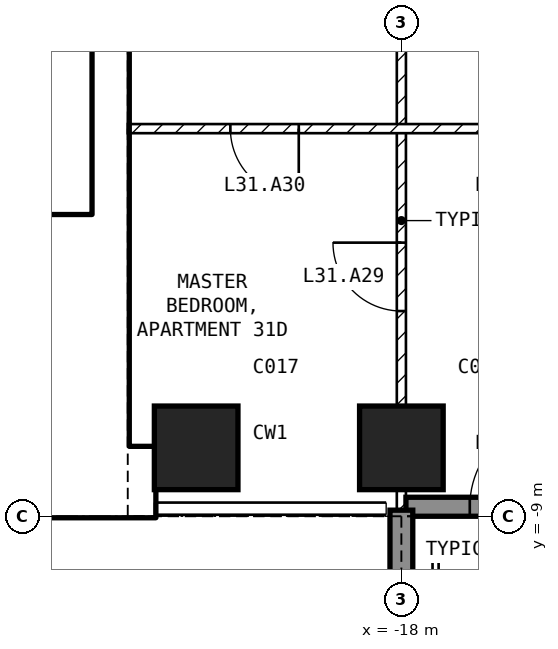
"""IFC4 building model, lengths in metres.
Left out: names, types, materials, properties, quantities, classifications, styles, units other than length and angle.
Written with IfcOpenShell. Run it as: python <this file> out.ifc"""

import sys

from ifc_helpers import new_model, si_unit, direction, frame, frame_2d, origin, origin_2d, place, context, subcontext, project, spatial, rectangle, extrude, element, fill, save


model = new_model("IFC4")
c1 = context("Model", 3, precision=1e-05, world=origin(), true_north=direction((0.0, 1.0)))
c2 = subcontext(c1, "Body", "Model", "MODEL_VIEW")
j1 = project(units=[si_unit("LENGTHUNIT", "METRE"), si_unit("PLANEANGLEUNIT", "RADIAN")], contexts=[c1])
p1 = place(None, origin())
s1 = spatial("IfcSite", under=j1, at=p1, CompositionType="ELEMENT")
p2 = place(p1, origin())
s2 = spatial("IfcBuilding", under=s1, at=p2, CompositionType="ELEMENT")
p3 = place(p2, frame((0.0, 0.0, 130.4)))
s3 = spatial("IfcBuildingStorey", under=s2, at=p3, CompositionType="ELEMENT", Elevation=130.4)
for number, where, z_axis, x_axis in (
    (1, (-20.7, -8.1, -0.25), (0.0, 0.0, 1.0), (1.0, 0.0, 0.0)),
    (2, (-18.0, -8.1, -0.25), (0.0, 0.0, 1.0), (1.0, 0.0, 0.0)),
):
    element("IfcColumn", number, at=place(p3, frame(where, z_axis=z_axis, x_axis=x_axis)), inside=s3, PredefinedType="COLUMN", context=c2, shape_type="SweptSolid", body=[
        extrude(rectangle(XDim=1.1, YDim=1.1, at=origin_2d()), origin(), (0.0, 0.0, 1.0), 3.5),
    ])
p4 = place(p3, frame((-17.94, -8.875, 0.0), z_axis=(0.0, 0.0, 1.0), x_axis=(1.0, 0.0, 0.0)))
e3 = element("IfcWall", 3, at=p4, inside=s3, PredefinedType="SOLIDWALL", context=c2, shape_type="SweptSolid", body=[
    extrude(rectangle(XDim=2.29, YDim=0.25, at=frame_2d((1.145, 0.0))), origin(), (0.0, 0.0, 1.0), 3.25),
])
p5 = place(p4, frame((0.84, 0.0, 0.0)))
e4 = element("IfcOpeningElement", 4, at=p5, cuts=e3, PredefinedType="OPENING", context=c2, shape_type="SweptSolid", body=[
    extrude(rectangle(XDim=1.2, YDim=2.4, at=frame_2d((0.6, 1.2))), frame((0.0, 0.135, 0.0), z_axis=(0.0, -1.0, 0.0), x_axis=(1.0, 0.0, 0.0)), (0.0, 0.0, 1.0), 0.27),
])
p6 = place(p3, frame((-18.0, -8.92, 0.0), z_axis=(0.0, 0.0, 1.0), x_axis=(0.0, -1.0, 0.0)))
e5 = element("IfcWall", 5, at=p6, inside=s3, PredefinedType="SOLIDWALL", context=c2, shape_type="SweptSolid", body=[
    extrude(rectangle(XDim=2.82, YDim=0.3, at=frame_2d((1.41, 0.0))), origin(), (0.0, 0.0, 1.0), 3.25),
])
p7 = place(p3, frame((-30.2, -8.55, 0.0), z_axis=(0.0, 0.0, 1.0), x_axis=(1.0, 0.0, 0.0)))
e6 = element("IfcWall", 6, at=p7, inside=s3, PredefinedType="SHEAR", context=c2, shape_type="SweptSolid", body=[
    extrude(rectangle(XDim=8.95, YDim=0.9, at=frame_2d((4.475, 0.0))), origin(), (0.0, 0.0, 1.0), 3.25),
])
p8 = place(p3, frame((-21.825, -8.1, 0.0), z_axis=(0.0, 0.0, 1.0), x_axis=(0.0, 1.0, 0.0)))
e7 = element("IfcWall", 7, at=p8, inside=s3, PredefinedType="SHEAR", context=c2, shape_type="SweptSolid", body=[
    extrude(rectangle(XDim=6.9, YDim=0.45, at=frame_2d((3.45, 0.0))), origin(), (0.0, 0.0, 1.0), 3.25),
])
p9 = place(p3, frame((-28.35, -5.15, 0.0), z_axis=(0.0, 0.0, 1.0), x_axis=(1.0, 0.0, 0.0)))
e8 = element("IfcWall", 8, at=p9, inside=s3, PredefinedType="SOLIDWALL", context=c2, shape_type="SweptSolid", body=[
    extrude(rectangle(XDim=6.3, YDim=0.2, at=frame_2d((3.15, 0.0))), origin(), (0.0, 0.0, 1.0), 3.25),
])
p10 = place(p9, frame((5.1, 0.0, 0.0)))
e9 = element("IfcOpeningElement", 9, at=p10, cuts=e8, PredefinedType="OPENING", context=c2, shape_type="SweptSolid", body=[
    extrude(rectangle(XDim=1.0, YDim=2.1, at=frame_2d((0.5, 1.05))), frame((0.0, 0.11, 0.0), z_axis=(0.0, -1.0, 0.0), x_axis=(1.0, 0.0, 0.0)), (0.0, 0.0, 1.0), 0.22),
])
p11 = place(p3, frame((-18.0, -8.92, 0.0), z_axis=(0.0, 0.0, 1.0), x_axis=(0.0, 1.0, 0.0)))
e10 = element("IfcWall", 10, at=p11, inside=s3, PredefinedType="PARTITIONING", context=c2, shape_type="SweptSolid", body=[
    extrude(rectangle(XDim=7.62, YDim=0.12, at=frame_2d((3.81, 0.0))), origin(), (0.0, 0.0, 1.0), 2.414),
])
p12 = place(p11, frame((2.62, 0.0, 0.0)))
e11 = element("IfcOpeningElement", 11, at=p12, cuts=e10, PredefinedType="OPENING", context=c2, shape_type="SweptSolid", body=[
    extrude(rectangle(XDim=0.9, YDim=2.1, at=frame_2d((0.45, 1.05))), frame((0.0, 0.07, 0.0), z_axis=(0.0, -1.0, 0.0), x_axis=(1.0, 0.0, 0.0)), (0.0, 0.0, 1.0), 0.14),
])
p13 = place(p3, frame((-15.0, -3.9, 0.0), z_axis=(0.0, 0.0, 1.0), x_axis=(-1.0, 0.0, 0.0)))
e12 = element("IfcWall", 12, at=p13, inside=s3, PredefinedType="PARTITIONING", context=c2, shape_type="SweptSolid", body=[
    extrude(rectangle(XDim=6.6, YDim=0.12, at=frame_2d((3.3, 0.0))), origin(), (0.0, 0.0, 1.0), 3.25),
])
p14 = place(p13, frame((1.05, 0.0, 0.0)))
e13 = element("IfcOpeningElement", 13, at=p14, cuts=e12, PredefinedType="OPENING", context=c2, shape_type="SweptSolid", body=[
    extrude(rectangle(XDim=0.9, YDim=2.1, at=frame_2d((0.45, 1.05))), frame((0.0, 0.07, 0.0), z_axis=(0.0, -1.0, 0.0), x_axis=(1.0, 0.0, 0.0)), (0.0, 0.0, 1.0), 0.14),
])
p15 = place(p13, frame((4.35, 0.0, 0.0)))
e14 = element("IfcOpeningElement", 14, at=p15, cuts=e12, PredefinedType="OPENING", context=c2, shape_type="SweptSolid", body=[
    extrude(rectangle(XDim=0.9, YDim=2.1, at=frame_2d((0.45, 1.05))), frame((0.0, 0.07, 0.0), z_axis=(0.0, -1.0, 0.0), x_axis=(1.0, 0.0, 0.0)), (0.0, 0.0, 1.0), 0.14),
])
p16 = place(p5, origin())
e15 = element("IfcDoor", 15, at=p16, inside=s3, OperationType="SINGLE_SWING_RIGHT", PredefinedType="DOOR", context=c2, shape_type="SweptSolid", body=[
    extrude(rectangle(XDim=1.2, YDim=2.4, at=frame_2d((0.6, 1.2))), frame((0.0, 0.025, 0.0), z_axis=(0.0, -1.0, 0.0), x_axis=(1.0, 0.0, 0.0)), (0.0, 0.0, 1.0), 0.05),
])
fill(e4, e15)
p17 = place(p10, origin())
e16 = element("IfcDoor", 16, at=p17, inside=s3, OperationType="SINGLE_SWING_LEFT", PredefinedType="DOOR", context=c2, shape_type="SweptSolid", body=[
    extrude(rectangle(XDim=1.0, YDim=2.1, at=frame_2d((0.5, 1.05))), frame((0.0, 0.025, 0.0), z_axis=(0.0, -1.0, 0.0), x_axis=(1.0, 0.0, 0.0)), (0.0, 0.0, 1.0), 0.05),
])
fill(e9, e16)
p18 = place(p12, origin())
e17 = element("IfcDoor", 17, at=p18, inside=s3, OperationType="SINGLE_SWING_RIGHT", PredefinedType="DOOR", context=c2, shape_type="SweptSolid", body=[
    extrude(rectangle(XDim=0.9, YDim=2.1, at=frame_2d((0.45, 1.05))), frame((0.0, 0.025, 0.0), z_axis=(0.0, -1.0, 0.0), x_axis=(1.0, 0.0, 0.0)), (0.0, 0.0, 1.0), 0.05),
])
fill(e11, e17)
p19 = place(p15, origin())
e18 = element("IfcDoor", 18, at=p19, inside=s3, OperationType="SINGLE_SWING_LEFT", PredefinedType="DOOR", context=c2, shape_type="SweptSolid", body=[
    extrude(rectangle(XDim=0.9, YDim=2.1, at=frame_2d((0.45, 1.05))), frame((0.0, 0.025, 0.0), z_axis=(0.0, -1.0, 0.0), x_axis=(1.0, 0.0, 0.0)), (0.0, 0.0, 1.0), 0.05),
])
fill(e14, e18)
save(model, sys.argv[1])
